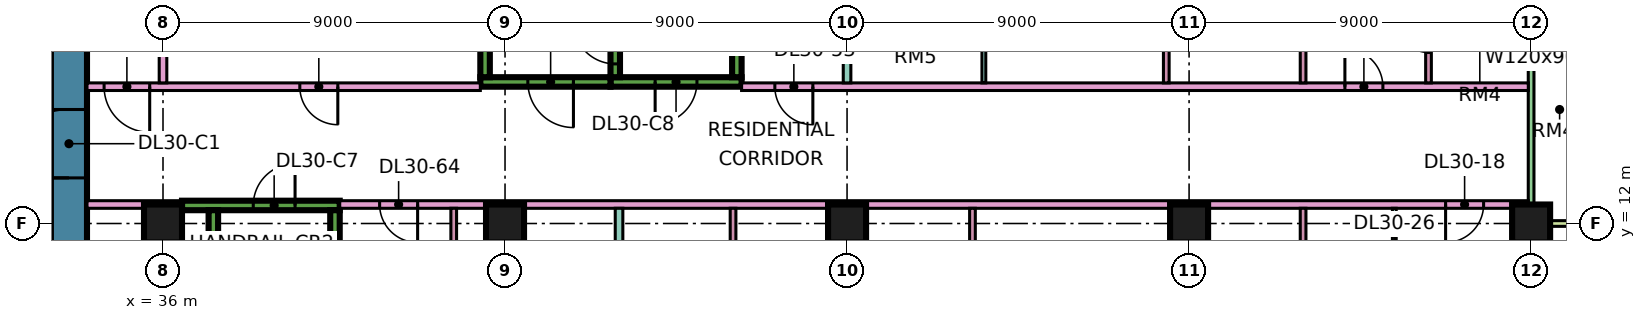
"""IFC4 building model, lengths in metres.
Left out: names, types, materials, properties, quantities, classifications, styles, units other than length and angle.
Written with IfcOpenShell. Run it as: python <this file> out.ifc"""

import sys

from ifc_helpers import new_model, si_unit, direction, frame, frame_2d, origin, origin_2d, place, context, subcontext, project, spatial, rectangle, extrude, element, fill, save


model = new_model("IFC4")
c1 = context("Model", 3, precision=1e-05, world=origin(), true_north=direction((0.0, 1.0)))
c2 = subcontext(c1, "Body", "Model", "MODEL_VIEW")
j1 = project(units=[si_unit("LENGTHUNIT", "METRE"), si_unit("PLANEANGLEUNIT", "RADIAN")], contexts=[c1])
p1 = place(None, origin())
s1 = spatial("IfcSite", under=j1, at=p1, CompositionType="ELEMENT")
p2 = place(p1, origin())
s2 = spatial("IfcBuilding", under=s1, at=p2, CompositionType="ELEMENT")
p3 = place(p2, frame((0.0, 0.0, 129.4)))
s3 = spatial("IfcBuildingStorey", under=s2, at=p3, CompositionType="ELEMENT", Elevation=129.4)
for number, where, z_axis, x_axis in (
    (1, (36.0, 12.0, 0.0), (0.0, 0.0, 1.0), (1.0, 0.0, 0.0)),
    (2, (45.0, 12.0, 0.0), (0.0, 0.0, 1.0), (1.0, 0.0, 0.0)),
    (3, (54.0, 12.0, 0.0), (0.0, 0.0, 1.0), (1.0, 0.0, 0.0)),
    (4, (63.0, 12.0, 0.0), (0.0, 0.0, 1.0), (1.0, 0.0, 0.0)),
    (5, (72.0, 12.0, 0.0), (0.0, 0.0, 1.0), (1.0, 0.0, 0.0)),
):
    element("IfcColumn", number, at=place(p3, frame(where, z_axis=z_axis, x_axis=x_axis)), inside=s3, PredefinedType="COLUMN", context=c2, shape_type="SweptSolid", body=[
        extrude(rectangle(XDim=1.0, YDim=1.0, at=origin_2d()), origin(), (0.0, 0.0, 1.0), 3.75),
    ])
p4 = place(p3, frame((33.525, 7.95, 0.0), z_axis=(0.0, 0.0, 1.0), x_axis=(0.0, 1.0, 0.0)))
e6 = element("IfcWall", 6, at=p4, inside=s3, PredefinedType="SHEAR", context=c2, shape_type="SweptSolid", body=[
    extrude(rectangle(XDim=11.1, YDim=0.95, at=frame_2d((5.55, 0.0))), origin(), (0.0, 0.0, 1.0), 3.75),
])
p5 = place(p4, frame((5.25, 0.0, 0.0)))
e7 = element("IfcOpeningElement", 7, at=p5, cuts=e6, PredefinedType="OPENING", context=c2, shape_type="SweptSolid", body=[
    extrude(rectangle(XDim=1.8, YDim=2.4, at=frame_2d((0.9, 1.2))), frame((0.0, 0.485, 0.0), z_axis=(0.0, -1.0, 0.0), x_axis=(1.0, 0.0, 0.0)), (0.0, 0.0, 1.0), 0.97),
])
p6 = place(p3, frame((36.5, 12.475, 0.0), z_axis=(0.0, 0.0, 1.0), x_axis=(1.0, 0.0, 0.0)))
e8 = element("IfcWall", 8, at=p6, inside=s3, PredefinedType="SHEAR", context=c2, shape_type="SweptSolid", body=[
    extrude(rectangle(XDim=4.15, YDim=0.25, at=frame_2d((2.075, 0.0))), origin(), (0.0, 0.0, 1.0), 3.75),
])
p7 = place(p6, frame((1.875, 0.0, 0.0)))
e9 = element("IfcOpeningElement", 9, at=p7, cuts=e8, PredefinedType="OPENING", context=c2, shape_type="SweptSolid", body=[
    extrude(rectangle(XDim=1.1, YDim=2.2, at=frame_2d((0.55, 1.1))), frame((0.0, 0.135, 0.0), z_axis=(0.0, -1.0, 0.0), x_axis=(1.0, 0.0, 0.0)), (0.0, 0.0, 1.0), 0.27),
])
for number, where, z_axis, x_axis in (
    (10, (37.325, 5.85, 0.0), (0.0, 0.0, 1.0), (0.0, 1.0, 0.0)),
    (11, (40.525, 5.85, 0.0), (0.0, 0.0, 1.0), (0.0, 1.0, 0.0)),
):
    element("IfcWall", number, at=place(p3, frame(where, z_axis=z_axis, x_axis=x_axis)), inside=s3, PredefinedType="SHEAR", context=c2, shape_type="SweptSolid", body=[
        extrude(rectangle(XDim=6.5, YDim=0.25, at=frame_2d((3.25, 0.0))), origin(), (0.0, 0.0, 1.0), 3.75),
    ])
p8 = place(p3, frame((47.775, 15.725, 0.0), z_axis=(0.0, 0.0, 1.0), x_axis=(1.0, 0.0, 0.0)))
e12 = element("IfcWall", 12, at=p8, inside=s3, PredefinedType="SHEAR", context=c2, shape_type="SweptSolid", body=[
    extrude(rectangle(XDim=3.45, YDim=0.25, at=frame_2d((1.725, 0.0))), origin(), (0.0, 0.0, 1.0), 3.75),
])
p9 = place(p8, frame((1.175, 0.0, 0.0)))
e13 = element("IfcOpeningElement", 13, at=p9, cuts=e12, PredefinedType="OPENING", context=c2, shape_type="SweptSolid", body=[
    extrude(rectangle(XDim=1.1, YDim=2.2, at=frame_2d((0.55, 1.1))), frame((0.0, 0.135, 0.0), z_axis=(0.0, -1.0, 0.0), x_axis=(1.0, 0.0, 0.0)), (0.0, 0.0, 1.0), 0.27),
])
p10 = place(p3, frame((47.9, 15.85, 0.0), z_axis=(0.0, 0.0, 1.0), x_axis=(0.0, 1.0, 0.0)))
e14 = element("IfcWall", 14, at=p10, inside=s3, PredefinedType="SHEAR", context=c2, shape_type="SweptSolid", body=[
    extrude(rectangle(XDim=6.5, YDim=0.25, at=frame_2d((3.25, 0.0))), origin(), (0.0, 0.0, 1.0), 3.75),
])
p11 = place(p10, frame((0.35, 0.0, 0.0)))
e15 = element("IfcOpeningElement", 15, at=p11, cuts=e14, PredefinedType="OPENING", context=c2, shape_type="SweptSolid", body=[
    extrude(rectangle(XDim=1.1, YDim=2.2, at=frame_2d((0.55, 1.1))), frame((0.0, 0.135, 0.0), z_axis=(0.0, -1.0, 0.0), x_axis=(1.0, 0.0, 0.0)), (0.0, 0.0, 1.0), 0.27),
])
p12 = place(p3, frame((51.1, 15.85, 0.0), z_axis=(0.0, 0.0, 1.0), x_axis=(0.0, 1.0, 0.0)))
e16 = element("IfcWall", 16, at=p12, inside=s3, PredefinedType="SHEAR", context=c2, shape_type="SweptSolid", body=[
    extrude(rectangle(XDim=6.5, YDim=0.25, at=frame_2d((3.25, 0.0))), origin(), (0.0, 0.0, 1.0), 3.75),
])
p13 = place(p3, frame((44.35, 15.725, 0.0), z_axis=(0.0, 0.0, 1.0), x_axis=(1.0, 0.0, 0.0)))
e17 = element("IfcWall", 17, at=p13, inside=s3, PredefinedType="SHEAR", context=c2, shape_type="SweptSolid", body=[
    extrude(rectangle(XDim=3.425, YDim=0.25, at=frame_2d((1.712, 0.0))), origin(), (0.0, 0.0, 1.0), 3.75),
])
p14 = place(p13, frame((1.25, 0.0, 0.0)))
e18 = element("IfcOpeningElement", 18, at=p14, cuts=e17, PredefinedType="OPENING", context=c2, shape_type="SweptSolid", body=[
    extrude(rectangle(XDim=1.2, YDim=2.2, at=frame_2d((0.6, 1.1))), frame((0.0, 0.135, 0.0), z_axis=(0.0, -1.0, 0.0), x_axis=(1.0, 0.0, 0.0)), (0.0, 0.0, 1.0), 0.27),
])
p15 = place(p3, frame((44.475, 15.85, 0.0), z_axis=(0.0, 0.0, 1.0), x_axis=(0.0, 1.0, 0.0)))
e19 = element("IfcWall", 19, at=p15, inside=s3, PredefinedType="SHEAR", context=c2, shape_type="SweptSolid", body=[
    extrude(rectangle(XDim=6.5, YDim=0.25, at=frame_2d((3.25, 0.0))), origin(), (0.0, 0.0, 1.0), 3.75),
])
p16 = place(p15, frame((1.75, 0.0, 0.0)))
e20 = element("IfcOpeningElement", 20, at=p16, cuts=e19, PredefinedType="OPENING", context=c2, shape_type="SweptSolid", body=[
    extrude(rectangle(XDim=1.1, YDim=2.2, at=frame_2d((0.55, 1.1))), frame((0.0, 0.135, 0.0), z_axis=(0.0, -1.0, 0.0), x_axis=(1.0, 0.0, 0.0)), (0.0, 0.0, 1.0), 0.27),
])
p17 = place(p15, frame((4.3, 0.0, 0.0)))
e21 = element("IfcOpeningElement", 21, at=p17, cuts=e19, PredefinedType="OPENING", context=c2, shape_type="SweptSolid", body=[
    extrude(rectangle(XDim=1.1, YDim=2.2, at=frame_2d((0.55, 1.1))), frame((0.0, 0.135, 0.0), z_axis=(0.0, -1.0, 0.0), x_axis=(1.0, 0.0, 0.0)), (0.0, 0.0, 1.0), 0.27),
])
p18 = place(p3, frame((72.0, 12.075, 0.0), z_axis=(0.0, 0.0, 1.0), x_axis=(0.0, 1.0, 0.0)))
e22 = element("IfcWall", 22, at=p18, inside=s3, PredefinedType="SOLIDWALL", context=c2, shape_type="SweptSolid", body=[
    extrude(rectangle(XDim=10.35, YDim=0.15, at=frame_2d((5.175, 0.0))), origin(), (0.0, 0.0, 1.0), 3.35),
])
p19 = place(p18, frame((4.275, 0.0, 1.7)))
e23 = element("IfcOpeningElement", 23, at=p19, cuts=e22, PredefinedType="OPENING", context=c2, shape_type="SweptSolid", body=[
    extrude(rectangle(XDim=1.2, YDim=0.9, at=frame_2d((0.6, 0.45))), frame((0.0, 0.085, 0.0), z_axis=(0.0, -1.0, 0.0), x_axis=(1.0, 0.0, 0.0)), (0.0, 0.0, 1.0), 0.17),
])
p20 = place(p18, frame((7.988, 0.0, 0.45)))
e24 = element("IfcOpeningElement", 24, at=p20, cuts=e22, PredefinedType="OPENING", context=c2, shape_type="SweptSolid", body=[
    extrude(rectangle(XDim=1.8, YDim=2.4, at=frame_2d((0.9, 1.2))), frame((0.0, 0.085, 0.0), z_axis=(0.0, -1.0, 0.0), x_axis=(1.0, 0.0, 0.0)), (0.0, 0.0, 1.0), 0.17),
])
p21 = place(p3, frame((73.5, 12.0, 0.0), z_axis=(0.0, 0.0, 1.0), x_axis=(-1.0, 0.0, 0.0)))
e25 = element("IfcWall", 25, at=p21, inside=s3, PredefinedType="SOLIDWALL", context=c2, shape_type="SweptSolid", body=[
    extrude(rectangle(XDim=1.5, YDim=0.15, at=frame_2d((0.75, 0.0))), origin(), (0.0, 0.0, 1.0), 3.35),
])
p22 = place(p3, frame((34.0, 12.5, 0.0), z_axis=(0.0, 0.0, 1.0), x_axis=(1.0, 0.0, 0.0)))
e26 = element("IfcWall", 26, at=p22, inside=s3, PredefinedType="PARTITIONING", context=c2, shape_type="SweptSolid", body=[
    extrude(rectangle(XDim=2.501, YDim=0.2, at=frame_2d((1.25, 0.0))), origin(), (0.0, 0.0, 1.0), 3.35),
])
p23 = place(p3, frame((34.0, 15.6, 0.0), z_axis=(0.0, 0.0, 1.0), x_axis=(1.0, 0.0, 0.0)))
e27 = element("IfcWall", 27, at=p23, inside=s3, PredefinedType="PARTITIONING", context=c2, shape_type="SweptSolid", body=[
    extrude(rectangle(XDim=10.35, YDim=0.2, at=frame_2d((5.175, 0.0))), origin(), (0.0, 0.0, 1.0), 3.35),
])
p24 = place(p23, frame((5.6, 0.0, 0.0)))
e28 = element("IfcOpeningElement", 28, at=p24, cuts=e27, PredefinedType="OPENING", context=c2, shape_type="SweptSolid", body=[
    extrude(rectangle(XDim=1.0, YDim=2.1, at=frame_2d((0.5, 1.05))), frame((0.0, 0.11, 0.0), z_axis=(0.0, -1.0, 0.0), x_axis=(1.0, 0.0, 0.0)), (0.0, 0.0, 1.0), 0.22),
])
p25 = place(p23, frame((0.45, 0.0, 0.0)))
e29 = element("IfcOpeningElement", 29, at=p25, cuts=e27, PredefinedType="OPENING", context=c2, shape_type="SweptSolid", body=[
    extrude(rectangle(XDim=1.2, YDim=2.1, at=frame_2d((0.6, 1.05))), frame((0.0, 0.11, 0.0), z_axis=(0.0, -1.0, 0.0), x_axis=(1.0, 0.0, 0.0)), (0.0, 0.0, 1.0), 0.22),
])
p26 = place(p3, frame((36.0, 15.7, 0.0), z_axis=(0.0, 0.0, 1.0), x_axis=(0.0, 1.0, 0.0)))
e30 = element("IfcWall", 30, at=p26, inside=s3, PredefinedType="PARTITIONING", context=c2, shape_type="SweptSolid", body=[
    extrude(rectangle(XDim=8.3, YDim=0.2, at=frame_2d((4.15, 0.0))), origin(), (0.0, 0.0, 1.0), 3.35),
])
p27 = place(p3, frame((40.65, 12.5, 0.0), z_axis=(0.0, 0.0, 1.0), x_axis=(1.0, 0.0, 0.0)))
e31 = element("IfcWall", 31, at=p27, inside=s3, PredefinedType="PARTITIONING", context=c2, shape_type="SweptSolid", body=[
    extrude(rectangle(XDim=31.276, YDim=0.2, at=frame_2d((15.638, 0.0))), origin(), (0.0, 0.0, 1.0), 3.35),
])
p28 = place(p27, frame((29.1, 0.0, 0.0)))
e32 = element("IfcOpeningElement", 32, at=p28, cuts=e31, PredefinedType="OPENING", context=c2, shape_type="SweptSolid", body=[
    extrude(rectangle(XDim=1.0, YDim=2.1, at=frame_2d((0.5, 1.05))), frame((0.0, 0.11, 0.0), z_axis=(0.0, -1.0, 0.0), x_axis=(1.0, 0.0, 0.0)), (0.0, 0.0, 1.0), 0.22),
])
p29 = place(p27, frame((1.05, 0.0, 0.0)))
e33 = element("IfcOpeningElement", 33, at=p29, cuts=e31, PredefinedType="OPENING", context=c2, shape_type="SweptSolid", body=[
    extrude(rectangle(XDim=1.0, YDim=2.1, at=frame_2d((0.5, 1.05))), frame((0.0, 0.11, 0.0), z_axis=(0.0, -1.0, 0.0), x_axis=(1.0, 0.0, 0.0)), (0.0, 0.0, 1.0), 0.22),
])
p30 = place(p3, frame((43.65, 5.825, 0.0), z_axis=(0.0, 0.0, 1.0), x_axis=(0.0, 1.0, 0.0)))
e34 = element("IfcWall", 34, at=p30, inside=s3, PredefinedType="PARTITIONING", context=c2, shape_type="SweptSolid", body=[
    extrude(rectangle(XDim=6.575, YDim=0.15, at=frame_2d((3.288, 0.0))), origin(), (0.0, 0.0, 1.0), 3.35),
])
p31 = place(p30, frame((4.425, 0.0, 0.0)))
e35 = element("IfcOpeningElement", 35, at=p31, cuts=e34, PredefinedType="OPENING", context=c2, shape_type="SweptSolid", body=[
    extrude(rectangle(XDim=0.9, YDim=2.1, at=frame_2d((0.45, 1.05))), frame((0.0, 0.085, 0.0), z_axis=(0.0, -1.0, 0.0), x_axis=(1.0, 0.0, 0.0)), (0.0, 0.0, 1.0), 0.17),
])
p32 = place(p3, frame((48.0, 0.0, 0.0), z_axis=(0.0, 0.0, 1.0), x_axis=(0.0, 1.0, 0.0)))
e36 = element("IfcWall", 36, at=p32, inside=s3, PredefinedType="PARTITIONING", context=c2, shape_type="SweptSolid", body=[
    extrude(rectangle(XDim=12.4, YDim=0.2, at=frame_2d((6.2, 0.0))), origin(), (0.0, 0.0, 1.0), 3.35),
])
p33 = place(p3, frame((51.0, 7.175, 0.0), z_axis=(0.0, 0.0, 1.0), x_axis=(0.0, 1.0, 0.0)))
e37 = element("IfcWall", 37, at=p33, inside=s3, PredefinedType="PARTITIONING", context=c2, shape_type="SweptSolid", body=[
    extrude(rectangle(XDim=5.225, YDim=0.15, at=frame_2d((2.612, 0.0))), origin(), (0.0, 0.0, 1.0), 3.35),
])
p34 = place(p3, frame((51.225, 15.6, 0.0), z_axis=(0.0, 0.0, 1.0), x_axis=(1.0, 0.0, 0.0)))
e38 = element("IfcWall", 38, at=p34, inside=s3, PredefinedType="PARTITIONING", context=c2, shape_type="SweptSolid", body=[
    extrude(rectangle(XDim=20.701, YDim=0.2, at=frame_2d((10.351, 0.0))), origin(), (0.0, 0.0, 1.0), 3.35),
])
p35 = place(p34, frame((15.875, 0.0, 0.0)))
e39 = element("IfcOpeningElement", 39, at=p35, cuts=e38, PredefinedType="OPENING", context=c2, shape_type="SweptSolid", body=[
    extrude(rectangle(XDim=1.0, YDim=2.1, at=frame_2d((0.5, 1.05))), frame((0.0, 0.11, 0.0), z_axis=(0.0, -1.0, 0.0), x_axis=(1.0, 0.0, 0.0)), (0.0, 0.0, 1.0), 0.22),
])
p36 = place(p34, frame((0.875, 0.0, 0.0)))
e40 = element("IfcOpeningElement", 40, at=p36, cuts=e38, PredefinedType="OPENING", context=c2, shape_type="SweptSolid", body=[
    extrude(rectangle(XDim=1.0, YDim=2.1, at=frame_2d((0.5, 1.05))), frame((0.0, 0.11, 0.0), z_axis=(0.0, -1.0, 0.0), x_axis=(1.0, 0.0, 0.0)), (0.0, 0.0, 1.0), 0.22),
])
p37 = place(p3, frame((53.7, 7.175, 0.0), z_axis=(0.0, 0.0, 1.0), x_axis=(0.0, 1.0, 0.0)))
e41 = element("IfcWall", 41, at=p37, inside=s3, PredefinedType="PARTITIONING", context=c2, shape_type="SweptSolid", body=[
    extrude(rectangle(XDim=5.225, YDim=0.15, at=frame_2d((2.612, 0.0))), origin(), (0.0, 0.0, 1.0), 3.35),
])
p38 = place(p3, frame((54.0, 15.7, 0.0), z_axis=(0.0, 0.0, 1.0), x_axis=(0.0, 1.0, 0.0)))
e42 = element("IfcWall", 42, at=p38, inside=s3, PredefinedType="PARTITIONING", context=c2, shape_type="SweptSolid", body=[
    extrude(rectangle(XDim=8.3, YDim=0.2, at=frame_2d((4.15, 0.0))), origin(), (0.0, 0.0, 1.0), 3.35),
])
p39 = place(p3, frame((57.3, 7.175, 0.0), z_axis=(0.0, 0.0, 1.0), x_axis=(0.0, 1.0, 0.0)))
e43 = element("IfcWall", 43, at=p39, inside=s3, PredefinedType="PARTITIONING", context=c2, shape_type="SweptSolid", body=[
    extrude(rectangle(XDim=5.225, YDim=0.15, at=frame_2d((2.612, 0.0))), origin(), (0.0, 0.0, 1.0), 3.35),
])
p40 = place(p3, frame((57.6, 15.7, 0.0), z_axis=(0.0, 0.0, 1.0), x_axis=(0.0, 1.0, 0.0)))
e44 = element("IfcWall", 44, at=p40, inside=s3, PredefinedType="PARTITIONING", context=c2, shape_type="SweptSolid", body=[
    extrude(rectangle(XDim=2.525, YDim=0.1, at=frame_2d((1.263, 0.0))), origin(), (0.0, 0.0, 1.0), 3.35),
])
p41 = place(p3, frame((62.4, 15.7, 0.0), z_axis=(0.0, 0.0, 1.0), x_axis=(0.0, 1.0, 0.0)))
e45 = element("IfcWall", 45, at=p41, inside=s3, PredefinedType="PARTITIONING", context=c2, shape_type="SweptSolid", body=[
    extrude(rectangle(XDim=2.525, YDim=0.15, at=frame_2d((1.263, 0.0))), origin(), (0.0, 0.0, 1.0), 3.35),
])
for number, where, z_axis, x_axis in (
    (46, (63.0, 7.175, 0.0), (0.0, 0.0, 1.0), (0.0, 1.0, 0.0)),
    (47, (66.0, 7.175, 0.0), (0.0, 0.0, 1.0), (0.0, 1.0, 0.0)),
):
    element("IfcWall", number, at=place(p3, frame(where, z_axis=z_axis, x_axis=x_axis)), inside=s3, PredefinedType="PARTITIONING", context=c2, shape_type="SweptSolid", body=[
        extrude(rectangle(XDim=5.225, YDim=0.15, at=frame_2d((2.612, 0.0))), origin(), (0.0, 0.0, 1.0), 3.35),
    ])
p42 = place(p3, frame((66.0, 15.7, 0.0), z_axis=(0.0, 0.0, 1.0), x_axis=(0.0, 1.0, 0.0)))
e48 = element("IfcWall", 48, at=p42, inside=s3, PredefinedType="PARTITIONING", context=c2, shape_type="SweptSolid", body=[
    extrude(rectangle(XDim=2.525, YDim=0.15, at=frame_2d((1.263, 0.0))), origin(), (0.0, 0.0, 1.0), 3.35),
])
p43 = place(p42, frame((0.9, 0.0, 0.0)))
e49 = element("IfcOpeningElement", 49, at=p43, cuts=e48, PredefinedType="OPENING", context=c2, shape_type="SweptSolid", body=[
    extrude(rectangle(XDim=0.8, YDim=2.1, at=frame_2d((0.4, 1.05))), frame((0.0, 0.085, 0.0), z_axis=(0.0, -1.0, 0.0), x_axis=(1.0, 0.0, 0.0)), (0.0, 0.0, 1.0), 0.17),
])
p44 = place(p3, frame((68.4, 7.175, 0.0), z_axis=(0.0, 0.0, 1.0), x_axis=(0.0, 1.0, 0.0)))
e50 = element("IfcWall", 50, at=p44, inside=s3, PredefinedType="PARTITIONING", context=c2, shape_type="SweptSolid", body=[
    extrude(rectangle(XDim=5.225, YDim=0.1, at=frame_2d((2.612, 0.0))), origin(), (0.0, 0.0, 1.0), 3.35),
])
p45 = place(p44, frame((2.175, 0.0, 0.0)))
e51 = element("IfcOpeningElement", 51, at=p45, cuts=e50, PredefinedType="OPENING", context=c2, shape_type="SweptSolid", body=[
    extrude(rectangle(XDim=0.9, YDim=2.1, at=frame_2d((0.45, 1.05))), frame((0.0, 0.06, 0.0), z_axis=(0.0, -1.0, 0.0), x_axis=(1.0, 0.0, 0.0)), (0.0, 0.0, 1.0), 0.12),
])
p46 = place(p3, frame((69.3, 15.7, 0.0), z_axis=(0.0, 0.0, 1.0), x_axis=(0.0, 1.0, 0.0)))
e52 = element("IfcWall", 52, at=p46, inside=s3, PredefinedType="PARTITIONING", context=c2, shape_type="SweptSolid", body=[
    extrude(rectangle(XDim=2.675, YDim=0.15, at=frame_2d((1.337, 0.0))), origin(), (0.0, 0.0, 1.0), 3.35),
])
p47 = place(p46, frame((0.8, 0.0, 0.0)))
e53 = element("IfcOpeningElement", 53, at=p47, cuts=e52, PredefinedType="OPENING", context=c2, shape_type="SweptSolid", body=[
    extrude(rectangle(XDim=0.8, YDim=2.1, at=frame_2d((0.4, 1.05))), frame((0.0, 0.085, 0.0), z_axis=(0.0, -1.0, 0.0), x_axis=(1.0, 0.0, 0.0)), (0.0, 0.0, 1.0), 0.17),
])
p48 = place(p19, origin())
e54 = element("IfcWindow", 54, at=p48, inside=s3, PartitioningType="SINGLE_PANEL", PredefinedType="WINDOW", context=c2, shape_type="SweptSolid", body=[
    extrude(rectangle(XDim=1.2, YDim=0.9, at=frame_2d((0.6, 0.45))), frame((0.0, 0.03, 0.0), z_axis=(0.0, -1.0, 0.0), x_axis=(1.0, 0.0, 0.0)), (0.0, 0.0, 1.0), 0.06),
])
fill(e23, e54)
p49 = place(p5, origin())
e55 = element("IfcDoor", 55, at=p49, inside=s3, OperationType="DOUBLE_DOOR_SINGLE_SWING", PredefinedType="DOOR", context=c2, shape_type="SweptSolid", body=[
    extrude(rectangle(XDim=1.8, YDim=2.4, at=frame_2d((0.9, 1.2))), frame((0.0, 0.025, 0.0), z_axis=(0.0, -1.0, 0.0), x_axis=(1.0, 0.0, 0.0)), (0.0, 0.0, 1.0), 0.05),
])
fill(e7, e55)
p50 = place(p7, frame((1.1, 0.0, 0.0), z_axis=(0.0, 0.0, 1.0), x_axis=(-1.0, 0.0, 0.0)))
e56 = element("IfcDoor", 56, at=p50, inside=s3, OperationType="SINGLE_SWING_RIGHT", PredefinedType="DOOR", context=c2, shape_type="SweptSolid", body=[
    extrude(rectangle(XDim=1.1, YDim=2.2, at=frame_2d((0.55, 1.1))), frame((0.0, 0.025, 0.0), z_axis=(0.0, -1.0, 0.0), x_axis=(1.0, 0.0, 0.0)), (0.0, 0.0, 1.0), 0.05),
])
fill(e9, e56)
p51 = place(p9, frame((1.1, 0.0, 0.0), z_axis=(0.0, 0.0, 1.0), x_axis=(-1.0, 0.0, 0.0)))
e57 = element("IfcDoor", 57, at=p51, inside=s3, OperationType="SINGLE_SWING_LEFT", PredefinedType="DOOR", context=c2, shape_type="SweptSolid", body=[
    extrude(rectangle(XDim=1.1, YDim=2.2, at=frame_2d((0.55, 1.1))), frame((0.0, 0.025, 0.0), z_axis=(0.0, -1.0, 0.0), x_axis=(1.0, 0.0, 0.0)), (0.0, 0.0, 1.0), 0.05),
])
fill(e13, e57)
p52 = place(p14, origin())
e58 = element("IfcDoor", 58, at=p52, inside=s3, OperationType="SINGLE_SWING_RIGHT", PredefinedType="DOOR", context=c2, shape_type="SweptSolid", body=[
    extrude(rectangle(XDim=1.2, YDim=2.2, at=frame_2d((0.6, 1.1))), frame((0.0, 0.025, 0.0), z_axis=(0.0, -1.0, 0.0), x_axis=(1.0, 0.0, 0.0)), (0.0, 0.0, 1.0), 0.05),
])
fill(e18, e58)
p53 = place(p11, frame((1.1, 0.0, 0.0), z_axis=(0.0, 0.0, 1.0), x_axis=(-1.0, 0.0, 0.0)))
e59 = element("IfcDoor", 59, at=p53, inside=s3, OperationType="SINGLE_SWING_RIGHT", PredefinedType="DOOR", context=c2, shape_type="SweptSolid", body=[
    extrude(rectangle(XDim=1.1, YDim=2.2, at=frame_2d((0.55, 1.1))), frame((0.0, 0.025, 0.0), z_axis=(0.0, -1.0, 0.0), x_axis=(1.0, 0.0, 0.0)), (0.0, 0.0, 1.0), 0.05),
])
fill(e15, e59)
p54 = place(p24, origin())
e60 = element("IfcDoor", 60, at=p54, inside=s3, OperationType="SINGLE_SWING_RIGHT", PredefinedType="DOOR", context=c2, shape_type="SweptSolid", body=[
    extrude(rectangle(XDim=1.0, YDim=2.1, at=frame_2d((0.5, 1.05))), frame((0.0, 0.025, 0.0), z_axis=(0.0, -1.0, 0.0), x_axis=(1.0, 0.0, 0.0)), (0.0, 0.0, 1.0), 0.05),
])
fill(e28, e60)
p55 = place(p47, frame((0.8, 0.0, 0.0), z_axis=(0.0, 0.0, 1.0), x_axis=(-1.0, 0.0, 0.0)))
e61 = element("IfcDoor", 61, at=p55, inside=s3, OperationType="SINGLE_SWING_RIGHT", PredefinedType="DOOR", context=c2, shape_type="SweptSolid", body=[
    extrude(rectangle(XDim=0.8, YDim=2.1, at=frame_2d((0.4, 1.05))), frame((0.0, 0.025, 0.0), z_axis=(0.0, -1.0, 0.0), x_axis=(1.0, 0.0, 0.0)), (0.0, 0.0, 1.0), 0.05),
])
fill(e53, e61)
p56 = place(p35, origin())
e62 = element("IfcDoor", 62, at=p56, inside=s3, OperationType="SINGLE_SWING_LEFT", PredefinedType="DOOR", context=c2, shape_type="SweptSolid", body=[
    extrude(rectangle(XDim=1.0, YDim=2.1, at=frame_2d((0.5, 1.05))), frame((0.0, 0.025, 0.0), z_axis=(0.0, -1.0, 0.0), x_axis=(1.0, 0.0, 0.0)), (0.0, 0.0, 1.0), 0.05),
])
fill(e39, e62)
p57 = place(p28, frame((1.0, 0.0, 0.0), z_axis=(0.0, 0.0, 1.0), x_axis=(-1.0, 0.0, 0.0)))
e63 = element("IfcDoor", 63, at=p57, inside=s3, OperationType="SINGLE_SWING_LEFT", PredefinedType="DOOR", context=c2, shape_type="SweptSolid", body=[
    extrude(rectangle(XDim=1.0, YDim=2.1, at=frame_2d((0.5, 1.05))), frame((0.0, 0.025, 0.0), z_axis=(0.0, -1.0, 0.0), x_axis=(1.0, 0.0, 0.0)), (0.0, 0.0, 1.0), 0.05),
])
fill(e32, e63)
p58 = place(p25, origin())
e64 = element("IfcDoor", 64, at=p58, inside=s3, OperationType="SINGLE_SWING_RIGHT", PredefinedType="DOOR", context=c2, shape_type="SweptSolid", body=[
    extrude(rectangle(XDim=1.2, YDim=2.1, at=frame_2d((0.6, 1.05))), frame((0.0, 0.025, 0.0), z_axis=(0.0, -1.0, 0.0), x_axis=(1.0, 0.0, 0.0)), (0.0, 0.0, 1.0), 0.05),
])
fill(e29, e64)
p59 = place(p36, origin())
e65 = element("IfcDoor", 65, at=p59, inside=s3, OperationType="SINGLE_SWING_RIGHT", PredefinedType="DOOR", context=c2, shape_type="SweptSolid", body=[
    extrude(rectangle(XDim=1.0, YDim=2.1, at=frame_2d((0.5, 1.05))), frame((0.0, 0.025, 0.0), z_axis=(0.0, -1.0, 0.0), x_axis=(1.0, 0.0, 0.0)), (0.0, 0.0, 1.0), 0.05),
])
fill(e40, e65)
p60 = place(p29, origin())
e66 = element("IfcDoor", 66, at=p60, inside=s3, OperationType="SINGLE_SWING_RIGHT", PredefinedType="DOOR", context=c2, shape_type="SweptSolid", body=[
    extrude(rectangle(XDim=1.0, YDim=2.1, at=frame_2d((0.5, 1.05))), frame((0.0, 0.025, 0.0), z_axis=(0.0, -1.0, 0.0), x_axis=(1.0, 0.0, 0.0)), (0.0, 0.0, 1.0), 0.05),
])
fill(e33, e66)
save(model, sys.argv[1])
